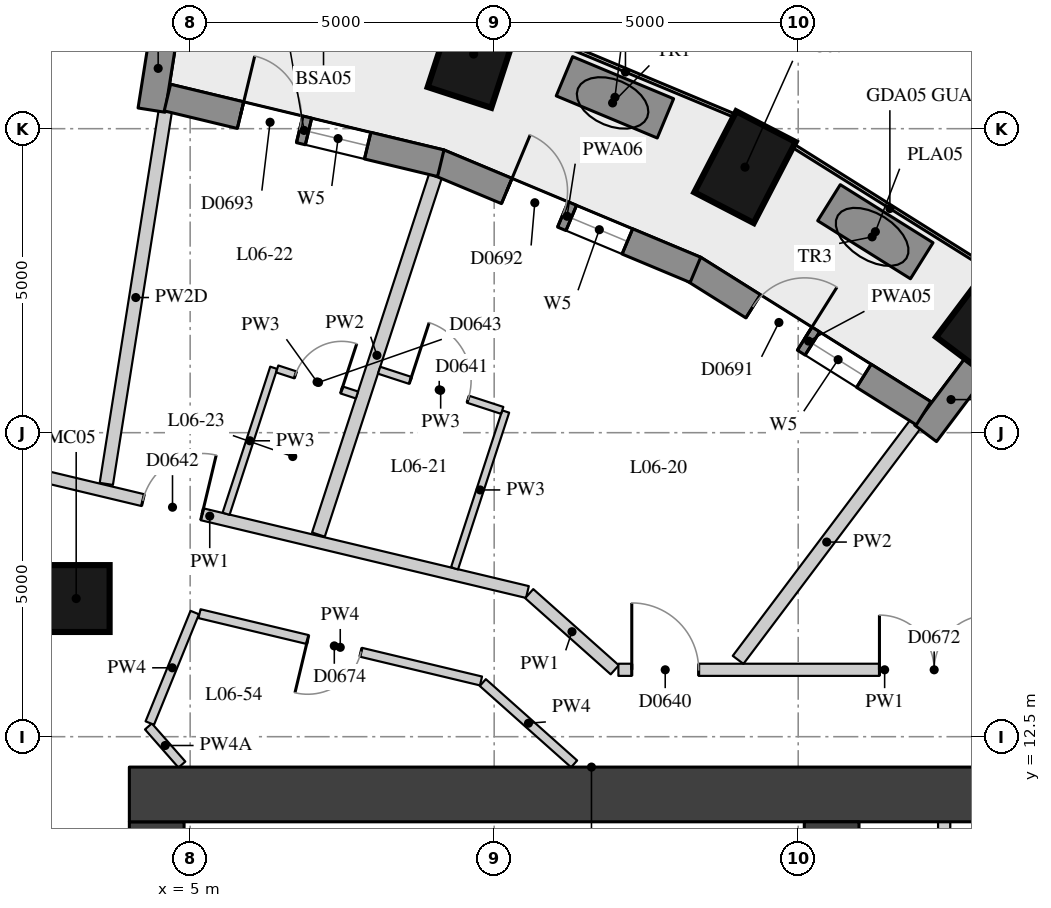
"""IFC4 building model, lengths in metres.
Left out: names, types, materials, properties, quantities, classifications, styles, units other than length and angle.
Written with IfcOpenShell. Run it as: python <this file> out.ifc"""

import sys

from ifc_helpers import new_model, si_unit, direction, frame, frame_2d, origin, origin_2d, place, context, subcontext, project, spatial, rectangle, extrude, element, fill, save


model = new_model("IFC4")
c1 = context("Model", 3, precision=1e-05, world=origin(), true_north=direction((0.0, 1.0)))
c2 = subcontext(c1, "Body", "Model", "MODEL_VIEW")
j1 = project(units=[si_unit("LENGTHUNIT", "METRE"), si_unit("PLANEANGLEUNIT", "RADIAN")], contexts=[c1])
p1 = place(None, origin())
s1 = spatial("IfcSite", under=j1, at=p1, CompositionType="ELEMENT")
p2 = place(p1, origin())
s2 = spatial("IfcBuilding", under=s1, at=p2, CompositionType="ELEMENT")
p3 = place(p2, frame((0.0, 0.0, 28.3)))
s3 = spatial("IfcBuildingStorey", under=s2, at=p3, CompositionType="ELEMENT", Elevation=28.3)
for number, where, z_axis, x_axis in (
    (1, (18.159, 19.343, 0.0), (0.0, 0.0, 1.0), (0.601, 0.799, 0.0)),
    (2, (14.125, 21.867, 0.0), (0.0, 0.0, 1.0), (0.46, 0.888, 0.0)),
    (3, (9.662, 23.727, 0.0), (0.0, 0.0, 1.0), (0.31, 0.951, 0.0)),
):
    element("IfcColumn", number, at=place(p3, frame(where, z_axis=z_axis, x_axis=x_axis)), inside=s3, PredefinedType="COLUMN", context=c2, shape_type="SweptSolid", body=[
        extrude(rectangle(XDim=1.5, YDim=1.1, at=origin_2d()), origin(), (0.0, 0.0, 1.0), 3.3),
    ])
p4 = place(p3, frame((3.126, 14.772, 0.0), z_axis=(0.0, 0.0, 1.0), x_axis=(1.0, 0.0, 0.0)))
e4 = element("IfcColumn", 4, at=p4, inside=s3, PredefinedType="COLUMN", context=c2, shape_type="SweptSolid", body=[
    extrude(rectangle(XDim=1.1, YDim=1.1, at=origin_2d()), origin(), (0.0, 0.0, 1.0), 3.3),
])
p5 = place(p3, frame((17.932, 18.6, 0.0), z_axis=(0.0, 0.0, 1.0), x_axis=(-0.601262851241, -0.799051302306, 0.0)))
e5 = element("IfcWall", 5, at=p5, inside=s3, PredefinedType="SOLIDWALL", context=c2, shape_type="SweptSolid", body=[
    extrude(rectangle(XDim=1.391, YDim=0.45, at=frame_2d((0.696, 0.0))), origin(), (0.0, 0.0, 1.0), 3.02),
])
p6 = place(p3, frame((4.583, 24.178, 0.0), z_axis=(0.0, 0.0, 1.0), x_axis=(-0.156133927791, -0.98773589415, 0.0)))
e6 = element("IfcWall", 6, at=p6, inside=s3, PredefinedType="SOLIDWALL", context=c2, shape_type="SweptSolid", body=[
    extrude(rectangle(XDim=1.39, YDim=0.45, at=frame_2d((0.695, 0.0))), origin(), (0.0, 0.0, 1.0), 2.47),
])
p7 = place(p3, frame((17.062, 17.819, 0.0), z_axis=(0.0, 0.0, 1.0), x_axis=(-0.846990101364, 0.531608660757, 0.0)))
e7 = element("IfcWall", 7, at=p7, inside=s3, PredefinedType="SOLIDWALL", context=c2, shape_type="SweptSolid", body=[
    extrude(rectangle(XDim=4.469, YDim=0.45, at=frame_2d((2.234, 0.0))), origin(), (0.0, 0.0, 1.0), 3.02),
])
p8 = place(p7, frame((1.159, 0.0, 0.4)))
e8 = element("IfcOpeningElement", 8, at=p8, cuts=e7, PredefinedType="OPENING", context=c2, shape_type="SweptSolid", body=[
    extrude(rectangle(XDim=1.0, YDim=1.75, at=frame_2d((0.5, 0.875))), frame((0.0, 0.235, 0.0), z_axis=(0.0, -1.0, 0.0), x_axis=(1.0, 0.0, 0.0)), (0.0, 0.0, 1.0), 0.47),
])
p9 = place(p7, frame((2.31, 0.0, 0.0)))
e9 = element("IfcOpeningElement", 9, at=p9, cuts=e7, PredefinedType="OPENING", context=c2, shape_type="SweptSolid", body=[
    extrude(rectangle(XDim=1.0, YDim=2.15, at=frame_2d((0.5, 1.075))), frame((0.0, 0.235, 0.0), z_axis=(0.0, -1.0, 0.0), x_axis=(1.0, 0.0, 0.0)), (0.0, 0.0, 1.0), 0.47),
])
p10 = place(p3, frame((13.31, 20.178, 0.0), z_axis=(0.0, 0.0, 1.0), x_axis=(-0.922634412489, 0.385675693935, 0.0)))
e10 = element("IfcWall", 10, at=p10, inside=s3, PredefinedType="SOLIDWALL", context=c2, shape_type="SweptSolid", body=[
    extrude(rectangle(XDim=4.577, YDim=0.45, at=frame_2d((2.288, 0.0))), origin(), (0.0, 0.0, 1.0), 3.02),
])
p11 = place(p10, frame((1.213, 0.0, 0.4)))
e11 = element("IfcOpeningElement", 11, at=p11, cuts=e10, PredefinedType="OPENING", context=c2, shape_type="SweptSolid", body=[
    extrude(rectangle(XDim=1.0, YDim=1.75, at=frame_2d((0.5, 0.875))), frame((0.0, 0.235, 0.0), z_axis=(0.0, -1.0, 0.0), x_axis=(1.0, 0.0, 0.0)), (0.0, 0.0, 1.0), 0.47),
])
p12 = place(p10, frame((2.363, 0.0, 0.0)))
e12 = element("IfcOpeningElement", 12, at=p12, cuts=e10, PredefinedType="OPENING", context=c2, shape_type="SweptSolid", body=[
    extrude(rectangle(XDim=1.0, YDim=2.15, at=frame_2d((0.5, 1.075))), frame((0.0, 0.235, 0.0), z_axis=(0.0, -1.0, 0.0), x_axis=(1.0, 0.0, 0.0)), (0.0, 0.0, 1.0), 0.47),
])
p13 = place(p3, frame((9.122, 21.932, 0.0), z_axis=(0.0, 0.0, 1.0), x_axis=(-0.972346547441, 0.233542697764, 0.0)))
e13 = element("IfcWall", 13, at=p13, inside=s3, PredefinedType="SOLIDWALL", context=c2, shape_type="SweptSolid", body=[
    extrude(rectangle(XDim=4.624, YDim=0.45, at=frame_2d((2.312, 0.0))), origin(), (0.0, 0.0, 1.0), 3.02),
])
p14 = place(p13, frame((1.237, 0.0, 0.4)))
e14 = element("IfcOpeningElement", 14, at=p14, cuts=e13, PredefinedType="OPENING", context=c2, shape_type="SweptSolid", body=[
    extrude(rectangle(XDim=1.0, YDim=1.75, at=frame_2d((0.5, 0.875))), frame((0.0, 0.235, 0.0), z_axis=(0.0, -1.0, 0.0), x_axis=(1.0, 0.0, 0.0)), (0.0, 0.0, 1.0), 0.47),
])
p15 = place(p13, frame((2.387, 0.0, 0.0)))
e15 = element("IfcOpeningElement", 15, at=p15, cuts=e13, PredefinedType="OPENING", context=c2, shape_type="SweptSolid", body=[
    extrude(rectangle(XDim=1.0, YDim=2.15, at=frame_2d((0.5, 1.075))), frame((0.0, 0.235, 0.0), z_axis=(0.0, -1.0, 0.0), x_axis=(1.0, 0.0, 0.0)), (0.0, 0.0, 1.0), 0.47),
])
p16 = place(p3, frame((17.032, 20.328, 0.0), z_axis=(0.0, 0.0, 1.0), x_axis=(-0.847609446823, 0.530620604252, 0.0)))
e16 = element("IfcWall", 16, at=p16, inside=s3, PredefinedType="USERDEFINED", context=c2, shape_type="SweptSolid", body=[
    extrude(rectangle(XDim=1.8, YDim=0.7, at=frame_2d((0.9, 0.0))), origin(), (0.0, 0.0, 1.0), 0.75),
])
p17 = place(p3, frame((12.817, 22.67, 0.0), z_axis=(0.0, 0.0, 1.0), x_axis=(-0.923000660042, 0.384798364811, 0.0)))
e17 = element("IfcWall", 17, at=p17, inside=s3, PredefinedType="USERDEFINED", context=c2, shape_type="SweptSolid", body=[
    extrude(rectangle(XDim=1.8, YDim=0.7, at=frame_2d((0.9, 0.0))), origin(), (0.0, 0.0, 1.0), 0.75),
])
p18 = place(p3, frame((4.45, -11.1, 0.0), z_axis=(0.0, 0.0, 1.0), x_axis=(0.0, 1.0, 0.0)))
e18 = element("IfcWall", 18, at=p18, inside=s3, PredefinedType="SHEAR", context=c2, shape_type="SweptSolid", body=[
    extrude(rectangle(XDim=22.2, YDim=0.9, at=frame_2d((11.1, 0.0))), origin(), (0.0, 0.0, 1.0), 3.02),
])
p19 = place(p18, frame((2.35, 0.0, 0.0)))
e19 = element("IfcOpeningElement", 19, at=p19, cuts=e18, PredefinedType="OPENING", context=c2, shape_type="SweptSolid", body=[
    extrude(rectangle(XDim=1.5, YDim=2.1, at=frame_2d((0.75, 1.05))), frame((0.0, 0.46, 0.0), z_axis=(0.0, -1.0, 0.0), x_axis=(1.0, 0.0, 0.0)), (0.0, 0.0, 1.0), 0.92),
])
p20 = place(p18, frame((5.45, 0.0, 0.0)))
e20 = element("IfcOpeningElement", 20, at=p20, cuts=e18, PredefinedType="OPENING", context=c2, shape_type="SweptSolid", body=[
    extrude(rectangle(XDim=1.8, YDim=2.1, at=frame_2d((0.9, 1.05))), frame((0.0, 0.46, 0.0), z_axis=(0.0, -1.0, 0.0), x_axis=(1.0, 0.0, 0.0)), (0.0, 0.0, 1.0), 0.92),
])
p21 = place(p18, frame((7.95, 0.0, 0.0)))
e21 = element("IfcOpeningElement", 21, at=p21, cuts=e18, PredefinedType="OPENING", context=c2, shape_type="SweptSolid", body=[
    extrude(rectangle(XDim=1.1, YDim=2.1, at=frame_2d((0.55, 1.05))), frame((0.0, 0.46, 0.0), z_axis=(0.0, -1.0, 0.0), x_axis=(1.0, 0.0, 0.0)), (0.0, 0.0, 1.0), 0.92),
])
p22 = place(p18, frame((10.6, 0.0, 0.0)))
e22 = element("IfcOpeningElement", 22, at=p22, cuts=e18, PredefinedType="OPENING", context=c2, shape_type="SweptSolid", body=[
    extrude(rectangle(XDim=1.0, YDim=2.1, at=frame_2d((0.5, 1.05))), frame((0.0, 0.46, 0.0), z_axis=(0.0, -1.0, 0.0), x_axis=(1.0, 0.0, 0.0)), (0.0, 0.0, 1.0), 0.92),
])
p23 = place(p18, frame((13.15, 0.0, 0.0)))
e23 = element("IfcOpeningElement", 23, at=p23, cuts=e18, PredefinedType="OPENING", context=c2, shape_type="SweptSolid", body=[
    extrude(rectangle(XDim=1.1, YDim=2.1, at=frame_2d((0.55, 1.05))), frame((0.0, 0.46, 0.0), z_axis=(0.0, -1.0, 0.0), x_axis=(1.0, 0.0, 0.0)), (0.0, 0.0, 1.0), 0.92),
])
p24 = place(p18, frame((14.95, 0.0, 0.0)))
e24 = element("IfcOpeningElement", 24, at=p24, cuts=e18, PredefinedType="OPENING", context=c2, shape_type="SweptSolid", body=[
    extrude(rectangle(XDim=1.8, YDim=2.1, at=frame_2d((0.9, 1.05))), frame((0.0, 0.46, 0.0), z_axis=(0.0, -1.0, 0.0), x_axis=(1.0, 0.0, 0.0)), (0.0, 0.0, 1.0), 0.92),
])
p25 = place(p18, frame((18.35, 0.0, 0.0)))
e25 = element("IfcOpeningElement", 25, at=p25, cuts=e18, PredefinedType="OPENING", context=c2, shape_type="SweptSolid", body=[
    extrude(rectangle(XDim=1.5, YDim=2.1, at=frame_2d((0.75, 1.05))), frame((0.0, 0.46, 0.0), z_axis=(0.0, -1.0, 0.0), x_axis=(1.0, 0.0, 0.0)), (0.0, 0.0, 1.0), 0.92),
])
p26 = place(p3, frame((4.0, 11.55, 0.0), z_axis=(0.0, 0.0, 1.0), x_axis=(1.0, 0.0, 0.0)))
e26 = element("IfcWall", 26, at=p26, inside=s3, PredefinedType="SHEAR", context=c2, shape_type="SweptSolid", body=[
    extrude(rectangle(XDim=15.2, YDim=0.9, at=frame_2d((7.6, 0.0))), origin(), (0.0, 0.0, 1.0), 3.02),
])
p27 = place(p3, frame((15.55, -11.1, 0.0), z_axis=(0.0, 0.0, 1.0), x_axis=(0.0, 1.0, 0.0)))
e27 = element("IfcWall", 27, at=p27, inside=s3, PredefinedType="SHEAR", context=c2, shape_type="SweptSolid", body=[
    extrude(rectangle(XDim=22.2, YDim=0.9, at=frame_2d((11.1, 0.0))), origin(), (0.0, 0.0, 1.0), 3.02),
])
p28 = place(p27, frame((15.6, 0.0, 0.0)))
e28 = element("IfcOpeningElement", 28, at=p28, cuts=e27, PredefinedType="OPENING", context=c2, shape_type="SweptSolid", body=[
    extrude(rectangle(XDim=1.0, YDim=2.1, at=frame_2d((0.5, 1.05))), frame((0.0, 0.46, 0.0), z_axis=(0.0, -1.0, 0.0), x_axis=(1.0, 0.0, 0.0)), (0.0, 0.0, 1.0), 0.92),
])
p29 = place(p27, frame((5.6, 0.0, 0.0)))
e29 = element("IfcOpeningElement", 29, at=p29, cuts=e27, PredefinedType="OPENING", context=c2, shape_type="SweptSolid", body=[
    extrude(rectangle(XDim=1.0, YDim=2.1, at=frame_2d((0.5, 1.05))), frame((0.0, 0.46, 0.0), z_axis=(0.0, -1.0, 0.0), x_axis=(1.0, 0.0, 0.0)), (0.0, 0.0, 1.0), 0.92),
])
p30 = place(p3, frame((17.4, 7.4, 0.0), z_axis=(0.0, 0.0, 1.0), x_axis=(0.0, 1.0, 0.0)))
e30 = element("IfcWall", 30, at=p30, inside=s3, PredefinedType="PARTITIONING", context=c2, shape_type="SweptSolid", body=[
    extrude(rectangle(XDim=3.7, YDim=0.2, at=frame_2d((1.85, 0.0))), origin(), (0.0, 0.0, 1.0), 3.02),
])
p31 = place(p3, frame((0.098, 17.377, 0.0), z_axis=(0.0, 0.0, 1.0), x_axis=(0.972602241469, -0.232475546864, 0.0)))
e31 = element("IfcWall", 31, at=p31, inside=s3, PredefinedType="PARTITIONING", context=c2, shape_type="SweptSolid", body=[
    extrude(rectangle(XDim=10.743, YDim=0.2, at=frame_2d((5.372, 0.0))), origin(), (0.0, 0.0, 1.0), 3.02),
])
p32 = place(p31, frame((4.242, 0.0, 0.0)))
e32 = element("IfcOpeningElement", 32, at=p32, cuts=e31, PredefinedType="OPENING", context=c2, shape_type="SweptSolid", body=[
    extrude(rectangle(XDim=1.0, YDim=2.1, at=frame_2d((0.5, 1.05))), frame((0.0, 0.11, 0.0), z_axis=(0.0, -1.0, 0.0), x_axis=(1.0, 0.0, 0.0)), (0.0, 0.0, 1.0), 0.22),
])
p33 = place(p31, frame((1.253, 0.0, 0.0)))
e33 = element("IfcOpeningElement", 33, at=p33, cuts=e31, PredefinedType="OPENING", context=c2, shape_type="SweptSolid", body=[
    extrude(rectangle(XDim=0.9, YDim=2.1, at=frame_2d((0.45, 1.05))), frame((0.0, 0.11, 0.0), z_axis=(0.0, -1.0, 0.0), x_axis=(1.0, 0.0, 0.0)), (0.0, 0.0, 1.0), 0.22),
])
p34 = place(p3, frame((10.576, 14.853, 0.0), z_axis=(0.0, 0.0, 1.0), x_axis=(0.746758163178, -0.665095666597, 0.0)))
e34 = element("IfcWall", 34, at=p34, inside=s3, PredefinedType="PARTITIONING", context=c2, shape_type="SweptSolid", body=[
    extrude(rectangle(XDim=1.884, YDim=0.2, at=frame_2d((0.942, 0.0))), origin(), (0.0, 0.0, 1.0), 3.02),
])
p35 = place(p3, frame((12.043, 13.6, 0.0), z_axis=(0.0, 0.0, 1.0), x_axis=(1.0, 0.0, 0.0)))
e35 = element("IfcWall", 35, at=p35, inside=s3, PredefinedType="PARTITIONING", context=c2, shape_type="SweptSolid", body=[
    extrude(rectangle(XDim=8.757, YDim=0.2, at=frame_2d((4.378, 0.0))), origin(), (0.0, 0.0, 1.0), 3.02),
])
p36 = place(p35, frame((0.22, 0.0, 0.0)))
e36 = element("IfcOpeningElement", 36, at=p36, cuts=e35, PredefinedType="OPENING", context=c2, shape_type="SweptSolid", body=[
    extrude(rectangle(XDim=1.1, YDim=2.1, at=frame_2d((0.55, 1.05))), frame((0.0, 0.11, 0.0), z_axis=(0.0, -1.0, 0.0), x_axis=(1.0, 0.0, 0.0)), (0.0, 0.0, 1.0), 0.22),
])
p37 = place(p35, frame((4.293, 0.0, 0.0)))
e37 = element("IfcOpeningElement", 37, at=p37, cuts=e35, PredefinedType="OPENING", context=c2, shape_type="SweptSolid", body=[
    extrude(rectangle(XDim=1.8, YDim=2.1, at=frame_2d((0.9, 1.05))), frame((0.0, 0.11, 0.0), z_axis=(0.0, -1.0, 0.0), x_axis=(1.0, 0.0, 0.0)), (0.0, 0.0, 1.0), 0.22),
])
p38 = place(p3, frame((4.865, 12.042, 0.0), z_axis=(0.0, 0.0, 1.0), x_axis=(-0.660014599896, 0.751252772323, 0.0)))
e38 = element("IfcWall", 38, at=p38, inside=s3, PredefinedType="PARTITIONING", context=c2, shape_type="SweptSolid", body=[
    extrude(rectangle(XDim=0.835, YDim=0.15, at=frame_2d((0.417, 0.0))), origin(), (0.0, 0.0, 1.0), 2.57),
])
p39 = place(p3, frame((4.336, 12.724, 0.0), z_axis=(0.0, 0.0, 1.0), x_axis=(0.376897652409, 0.926254910707, 0.0)))
e39 = element("IfcWall", 39, at=p39, inside=s3, PredefinedType="PARTITIONING", context=c2, shape_type="SweptSolid", body=[
    extrude(rectangle(XDim=1.962, YDim=0.15, at=frame_2d((0.981, 0.0))), origin(), (0.0, 0.0, 1.0), 3.02),
])
p40 = place(p3, frame((5.154, 14.523, 0.0), z_axis=(0.0, 0.0, 1.0), x_axis=(0.972595031209, -0.232505710182, 0.0)))
e40 = element("IfcWall", 40, at=p40, inside=s3, PredefinedType="PARTITIONING", context=c2, shape_type="SweptSolid", body=[
    extrude(rectangle(XDim=4.76, YDim=0.15, at=frame_2d((2.38, 0.0))), origin(), (0.0, 0.0, 1.0), 3.02),
])
p41 = place(p40, frame((1.829, 0.0, 0.0)))
e41 = element("IfcOpeningElement", 41, at=p41, cuts=e40, PredefinedType="OPENING", context=c2, shape_type="SweptSolid", body=[
    extrude(rectangle(XDim=0.9, YDim=2.1, at=frame_2d((0.45, 1.05))), frame((0.0, 0.085, 0.0), z_axis=(0.0, -1.0, 0.0), x_axis=(1.0, 0.0, 0.0)), (0.0, 0.0, 1.0), 0.17),
])
p42 = place(p3, frame((9.813, 13.39, 0.0), z_axis=(0.0, 0.0, 1.0), x_axis=(0.746772740714, -0.665079298825, 0.0)))
e42 = element("IfcWall", 42, at=p42, inside=s3, PredefinedType="PARTITIONING", context=c2, shape_type="SweptSolid", body=[
    extrude(rectangle(XDim=2.011, YDim=0.15, at=frame_2d((1.006, 0.0))), origin(), (0.0, 0.0, 1.0), 3.02),
])
p43 = place(p3, frame((16.927, 17.638, 0.0), z_axis=(0.0, 0.0, 1.0), x_axis=(-0.601183583641, -0.799110942711, 0.0)))
e43 = element("IfcWall", 43, at=p43, inside=s3, PredefinedType="PARTITIONING", context=c2, shape_type="SweptSolid", body=[
    extrude(rectangle(XDim=4.849, YDim=0.22, at=frame_2d((2.424, 0.0))), origin(), (0.0, 0.0, 1.0), 3.02),
])
p44 = place(p3, frame((9.034, 21.721, 0.0), z_axis=(0.0, 0.0, 1.0), x_axis=(-0.310247180826, -0.950655924501, 0.0)))
e44 = element("IfcWall", 44, at=p44, inside=s3, PredefinedType="PARTITIONING", context=c2, shape_type="SweptSolid", body=[
    extrude(rectangle(XDim=6.203, YDim=0.22, at=frame_2d((3.102, 0.0))), origin(), (0.0, 0.0, 1.0), 3.02),
])
p45 = place(p3, frame((4.591, 22.789, 0.0), z_axis=(0.0, 0.0, 1.0), x_axis=(-0.15615243256, -0.987732968877, 0.0)))
e45 = element("IfcWall", 45, at=p45, inside=s3, PredefinedType="PARTITIONING", context=c2, shape_type="SweptSolid", body=[
    extrude(rectangle(XDim=6.207, YDim=0.22, at=frame_2d((3.104, 0.0))), origin(), (0.0, 0.0, 1.0), 2.47),
])
p46 = place(p3, frame((9.348, 15.269, 0.0), z_axis=(0.0, 0.0, 1.0), x_axis=(0.310147893553, 0.950688321231, 0.0)))
e46 = element("IfcWall", 46, at=p46, inside=s3, PredefinedType="PARTITIONING", context=c2, shape_type="SweptSolid", body=[
    extrude(rectangle(XDim=2.713, YDim=0.12, at=frame_2d((1.357, 0.0))), origin(), (0.0, 0.0, 1.0), 3.02),
])
p47 = place(p3, frame((5.591, 16.167, 0.0), z_axis=(0.0, 0.0, 1.0), x_axis=(0.310246659943, 0.950656094492, 0.0)))
e47 = element("IfcWall", 47, at=p47, inside=s3, PredefinedType="PARTITIONING", context=c2, shape_type="SweptSolid", body=[
    extrude(rectangle(XDim=2.525, YDim=0.12, at=frame_2d((1.263, 0.0))), origin(), (0.0, 0.0, 1.0), 3.02),
])
p48 = place(p3, frame((10.132, 17.867, 0.0), z_axis=(0.0, 0.0, 1.0), x_axis=(-0.950681354321, 0.310169248227, 0.0)))
e48 = element("IfcWall", 48, at=p48, inside=s3, PredefinedType="PARTITIONING", context=c2, shape_type="SweptSolid", body=[
    extrude(rectangle(XDim=2.13, YDim=0.12, at=frame_2d((1.065, 0.0))), origin(), (0.0, 0.0, 1.0), 3.02),
])
p49 = place(p48, frame((0.59, 0.0, 0.0)))
e49 = element("IfcOpeningElement", 49, at=p49, cuts=e48, PredefinedType="OPENING", context=c2, shape_type="SweptSolid", body=[
    extrude(rectangle(XDim=1.0, YDim=2.1, at=frame_2d((0.5, 1.05))), frame((0.0, 0.07, 0.0), z_axis=(0.0, -1.0, 0.0), x_axis=(1.0, 0.0, 0.0)), (0.0, 0.0, 1.0), 0.14),
])
p50 = place(p3, frame((6.431, 18.549, 0.0), z_axis=(0.0, 0.0, 1.0), x_axis=(0.950628893115, -0.310329997864, 0.0)))
e50 = element("IfcWall", 50, at=p50, inside=s3, PredefinedType="PARTITIONING", context=c2, shape_type="SweptSolid", body=[
    extrude(rectangle(XDim=1.38, YDim=0.12, at=frame_2d((0.69, 0.0))), origin(), (0.0, 0.0, 1.0), 3.02),
])
p51 = place(p50, frame((0.315, 0.0, 0.0)))
e51 = element("IfcOpeningElement", 51, at=p51, cuts=e50, PredefinedType="OPENING", context=c2, shape_type="SweptSolid", body=[
    extrude(rectangle(XDim=0.8, YDim=2.1, at=frame_2d((0.4, 1.05))), frame((0.0, 0.07, 0.0), z_axis=(0.0, -1.0, 0.0), x_axis=(1.0, 0.0, 0.0)), (0.0, 0.0, 1.0), 0.14),
])
p52 = place(p8, origin())
e52 = element("IfcWindow", 52, at=p52, inside=s3, PartitioningType="SINGLE_PANEL", PredefinedType="WINDOW", context=c2, shape_type="SweptSolid", body=[
    extrude(rectangle(XDim=1.0, YDim=1.75, at=frame_2d((0.5, 0.875))), frame((0.0, 0.035, 0.0), z_axis=(0.0, -1.0, 0.0), x_axis=(1.0, 0.0, 0.0)), (0.0, 0.0, 1.0), 0.06),
])
fill(e8, e52)
p53 = place(p9, frame((1.0, 0.0, 0.0), z_axis=(0.0, 0.0, 1.0), x_axis=(-1.0, 0.0, 0.0)))
e53 = element("IfcDoor", 53, at=p53, inside=s3, OperationType="SINGLE_SWING_RIGHT", PredefinedType="DOOR", context=c2, shape_type="SweptSolid", body=[
    extrude(rectangle(XDim=1.0, YDim=2.15, at=frame_2d((0.5, 1.075))), frame((0.0, 0.075, 0.0), z_axis=(0.0, -1.0, 0.0), x_axis=(1.0, 0.0, 0.0)), (0.0, 0.0, 1.0), 0.05),
])
fill(e9, e53)
p54 = place(p11, origin())
e54 = element("IfcWindow", 54, at=p54, inside=s3, PartitioningType="SINGLE_PANEL", PredefinedType="WINDOW", context=c2, shape_type="SweptSolid", body=[
    extrude(rectangle(XDim=1.0, YDim=1.75, at=frame_2d((0.5, 0.875))), frame((0.0, 0.035, 0.0), z_axis=(0.0, -1.0, 0.0), x_axis=(1.0, 0.0, 0.0)), (0.0, 0.0, 1.0), 0.06),
])
fill(e11, e54)
p55 = place(p12, frame((1.0, 0.0, 0.0), z_axis=(0.0, 0.0, 1.0), x_axis=(-1.0, 0.0, 0.0)))
e55 = element("IfcDoor", 55, at=p55, inside=s3, OperationType="SINGLE_SWING_LEFT", PredefinedType="DOOR", context=c2, shape_type="SweptSolid", body=[
    extrude(rectangle(XDim=1.0, YDim=2.15, at=frame_2d((0.5, 1.075))), frame((0.0, 0.075, 0.0), z_axis=(0.0, -1.0, 0.0), x_axis=(1.0, 0.0, 0.0)), (0.0, 0.0, 1.0), 0.05),
])
fill(e12, e55)
p56 = place(p14, origin())
e56 = element("IfcWindow", 56, at=p56, inside=s3, PartitioningType="SINGLE_PANEL", PredefinedType="WINDOW", context=c2, shape_type="SweptSolid", body=[
    extrude(rectangle(XDim=1.0, YDim=1.75, at=frame_2d((0.5, 0.875))), frame((0.0, 0.035, 0.0), z_axis=(0.0, -1.0, 0.0), x_axis=(1.0, 0.0, 0.0)), (0.0, 0.0, 1.0), 0.06),
])
fill(e14, e56)
p57 = place(p15, frame((1.0, 0.0, 0.0), z_axis=(0.0, 0.0, 1.0), x_axis=(-1.0, 0.0, 0.0)))
e57 = element("IfcDoor", 57, at=p57, inside=s3, OperationType="SINGLE_SWING_LEFT", PredefinedType="DOOR", context=c2, shape_type="SweptSolid", body=[
    extrude(rectangle(XDim=1.0, YDim=2.15, at=frame_2d((0.5, 1.075))), frame((0.0, 0.075, 0.0), z_axis=(0.0, -1.0, 0.0), x_axis=(1.0, 0.0, 0.0)), (0.0, 0.0, 1.0), 0.05),
])
fill(e15, e57)
p58 = place(p36, origin())
e58 = element("IfcDoor", 58, at=p58, inside=s3, OperationType="SINGLE_SWING_LEFT", PredefinedType="DOOR", context=c2, shape_type="SweptSolid", body=[
    extrude(rectangle(XDim=1.1, YDim=2.1, at=frame_2d((0.55, 1.05))), frame((0.0, 0.025, 0.0), z_axis=(0.0, -1.0, 0.0), x_axis=(1.0, 0.0, 0.0)), (0.0, 0.0, 1.0), 0.05),
])
fill(e36, e58)
p59 = place(p49, origin())
e59 = element("IfcDoor", 59, at=p59, inside=s3, OperationType="SINGLE_SWING_LEFT", PredefinedType="DOOR", context=c2, shape_type="SweptSolid", body=[
    extrude(rectangle(XDim=1.0, YDim=2.1, at=frame_2d((0.5, 1.05))), frame((0.0, 0.025, 0.0), z_axis=(0.0, -1.0, 0.0), x_axis=(1.0, 0.0, 0.0)), (0.0, 0.0, 1.0), 0.05),
])
fill(e49, e59)
p60 = place(p32, origin())
e60 = element("IfcDoor", 60, at=p60, inside=s3, OperationType="SINGLE_SWING_RIGHT", PredefinedType="DOOR", context=c2, shape_type="SweptSolid", body=[
    extrude(rectangle(XDim=1.0, YDim=2.1, at=frame_2d((0.5, 1.05))), frame((0.0, 0.025, 0.0), z_axis=(0.0, -1.0, 0.0), x_axis=(1.0, 0.0, 0.0)), (0.0, 0.0, 1.0), 0.05),
])
fill(e32, e60)
p61 = place(p51, origin())
e61 = element("IfcDoor", 61, at=p61, inside=s3, OperationType="SINGLE_SWING_RIGHT", PredefinedType="DOOR", context=c2, shape_type="SweptSolid", body=[
    extrude(rectangle(XDim=0.8, YDim=2.1, at=frame_2d((0.4, 1.05))), frame((0.0, 0.025, 0.0), z_axis=(0.0, -1.0, 0.0), x_axis=(1.0, 0.0, 0.0)), (0.0, 0.0, 1.0), 0.05),
])
fill(e51, e61)
p62 = place(p37, origin())
e62 = element("IfcDoor", 62, at=p62, inside=s3, OperationType="DOUBLE_DOOR_SINGLE_SWING", PredefinedType="DOOR", context=c2, shape_type="SweptSolid", body=[
    extrude(rectangle(XDim=1.8, YDim=2.1, at=frame_2d((0.9, 1.05))), frame((0.0, 0.025, 0.0), z_axis=(0.0, -1.0, 0.0), x_axis=(1.0, 0.0, 0.0)), (0.0, 0.0, 1.0), 0.05),
])
fill(e37, e62)
p63 = place(p41, origin())
e63 = element("IfcDoor", 63, at=p63, inside=s3, OperationType="SINGLE_SWING_RIGHT", PredefinedType="DOOR", context=c2, shape_type="SweptSolid", body=[
    extrude(rectangle(XDim=0.9, YDim=2.1, at=frame_2d((0.45, 1.05))), frame((0.0, 0.025, 0.0), z_axis=(0.0, -1.0, 0.0), x_axis=(1.0, 0.0, 0.0)), (0.0, 0.0, 1.0), 0.05),
])
fill(e41, e63)
save(model, sys.argv[1])
